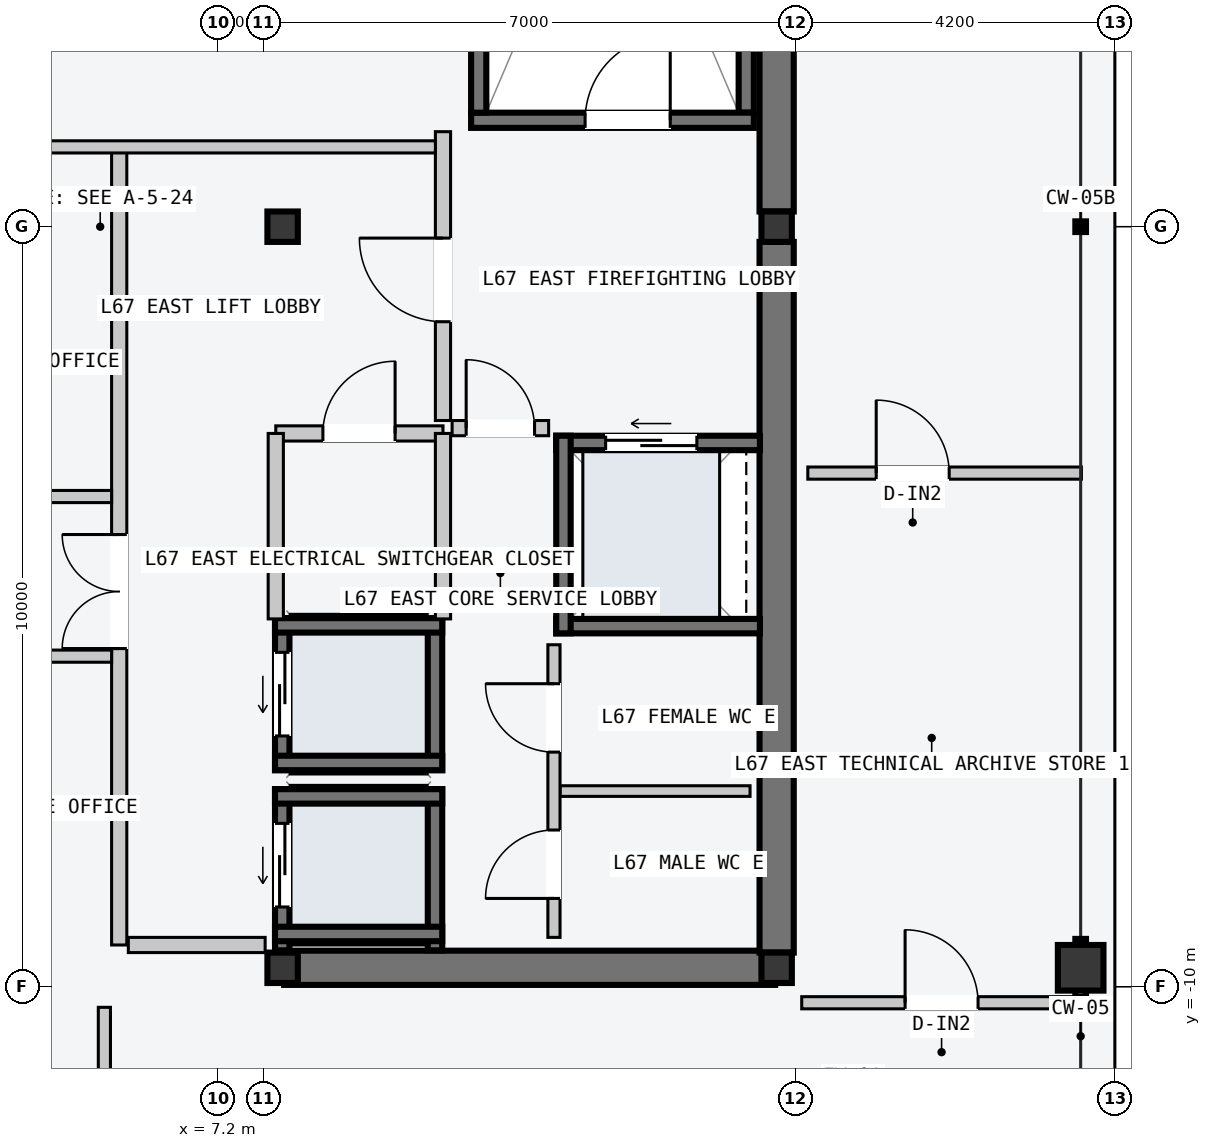
"""IFC4 building model, lengths in metres.
Left out: names, types, materials, properties, quantities, classifications, styles, units other than length and angle.
Written with IfcOpenShell. Run it as: python <this file> out.ifc"""

import sys

from ifc_helpers import new_model, si_unit, direction, frame, frame_2d, origin, origin_2d, place, context, subcontext, project, spatial, rectangle, hollow_rectangle, i_section, extrude, element, fill, save


model = new_model("IFC4")
c1 = context("Model", 3, precision=1e-05, world=origin(), true_north=direction((0.0, 1.0)))
c2 = subcontext(c1, "Body", "Model", "MODEL_VIEW")
j1 = project(units=[si_unit("LENGTHUNIT", "METRE"), si_unit("PLANEANGLEUNIT", "RADIAN")], contexts=[c1])
p1 = place(None, origin())
s1 = spatial("IfcSite", under=j1, at=p1, CompositionType="ELEMENT")
p2 = place(p1, origin())
s2 = spatial("IfcBuilding", under=s1, at=p2, CompositionType="ELEMENT")
p3 = place(p2, frame((0.0, 0.0, 254.4)))
s3 = spatial("IfcBuildingStorey", under=s2, at=p3, CompositionType="ELEMENT", Elevation=254.4)
p4 = place(p3, frame((8.07, -9.75, -0.2), z_axis=(0.0, 0.0, 1.0), x_axis=(1.0, 0.0, 0.0)))
e1 = element("IfcWall", 1, at=p4, inside=s3, PredefinedType="SHEAR", context=c2, shape_type="SweptSolid", body=[
    extrude(rectangle(XDim=6.46, YDim=0.45, at=frame_2d((3.23, 0.0))), origin(), (0.0, 0.0, 1.0), 3.6),
])
for number, where, z_axis, x_axis in (
    (2, (14.55, -9.55, -0.2), (0.0, 0.0, 1.0), (0.0, 1.0, 0.0)),
    (3, (14.55, 0.2, -0.2), (0.0, 0.0, 1.0), (0.0, 1.0, 0.0)),
):
    element("IfcWall", number, at=place(p3, frame(where, z_axis=z_axis, x_axis=x_axis)), inside=s3, PredefinedType="SHEAR", context=c2, shape_type="SweptSolid", body=[
        extrude(rectangle(XDim=9.35, YDim=0.45, at=frame_2d((4.675, 0.0))), origin(), (0.0, 0.0, 1.0), 3.6),
    ])
p5 = place(p3, frame((14.15, 1.5, -0.2), z_axis=(0.0, 0.0, 1.0), x_axis=(0.0, 1.0, 0.0)))
e4 = element("IfcWall", 4, at=p5, inside=s3, PredefinedType="SOLIDWALL", context=c2, shape_type="SweptSolid", body=[
    extrude(rectangle(XDim=7.8, YDim=0.2, at=frame_2d((3.9, 0.0))), origin(), (0.0, 0.0, 1.0), 3.6),
])
p6 = place(p3, frame((10.53, 1.4, -0.2), z_axis=(0.0, 0.0, 1.0), x_axis=(1.0, 0.0, 0.0)))
e5 = element("IfcWall", 5, at=p6, inside=s3, PredefinedType="SOLIDWALL", context=c2, shape_type="SweptSolid", body=[
    extrude(rectangle(XDim=3.72, YDim=0.2, at=frame_2d((1.86, 0.0))), origin(), (0.0, 0.0, 1.0), 3.6),
])
p7 = place(p6, frame((1.5, 0.0, 0.2)))
e6 = element("IfcOpeningElement", 6, at=p7, cuts=e5, PredefinedType="OPENING", context=c2, shape_type="SweptSolid", body=[
    extrude(rectangle(XDim=1.12, YDim=2.18, at=frame_2d((0.56, 1.09))), frame((0.0, 0.11, 0.0), z_axis=(0.0, -1.0, 0.0), x_axis=(1.0, 0.0, 0.0)), (0.0, 0.0, 1.0), 0.22),
])
p8 = place(p3, frame((10.63, 1.5, -0.2), z_axis=(0.0, 0.0, 1.0), x_axis=(0.0, 1.0, 0.0)))
e7 = element("IfcWall", 7, at=p8, inside=s3, PredefinedType="SOLIDWALL", context=c2, shape_type="SweptSolid", body=[
    extrude(rectangle(XDim=7.8, YDim=0.2, at=frame_2d((3.9, 0.0))), origin(), (0.0, 0.0, 1.0), 3.6),
])
for number, where, z_axis, x_axis in (
    (8, (8.05, -9.75, 0.0), (0.0, 0.0, 1.0), (1.0, 0.0, 0.0)),
    (9, (8.05, 0.0, 0.0), (0.0, 0.0, 1.0), (1.0, 0.0, 0.0)),
    (10, (14.55, -9.75, 0.0), (0.0, 0.0, 1.0), (1.0, 0.0, 0.0)),
    (11, (14.55, 0.0, 0.0), (0.0, 0.0, 1.0), (1.0, 0.0, 0.0)),
):
    element("IfcColumn", number, at=place(p3, frame(where, z_axis=z_axis, x_axis=x_axis)), inside=s3, PredefinedType="COLUMN", context=c2, shape_type="SweptSolid", body=[
        extrude(i_section(OverallWidth=0.4, OverallDepth=0.4, WebThickness=0.013, FlangeThickness=0.021, at=origin_2d()), origin(), (0.0, 0.0, 1.0), 3.6),
    ])
p9 = place(p3, frame((18.55, -9.75, 0.0), z_axis=(0.0, 0.0, 1.0), x_axis=(0.0, 1.0, 0.0)))
e12 = element("IfcColumn", 12, at=p9, inside=s3, PredefinedType="COLUMN", context=c2, shape_type="SweptSolid", body=[
    extrude(hollow_rectangle(XDim=0.6, YDim=0.6, WallThickness=0.025, at=origin_2d()), origin(), (0.0, 0.0, 1.0), 3.6),
])
p10 = place(p3, frame((8.045, -9.52, -0.2), z_axis=(0.0, 0.0, 1.0), x_axis=(0.0, 1.0, 0.0)))
e13 = element("IfcWall", 13, at=p10, inside=s3, PredefinedType="SOLIDWALL", context=c2, shape_type="SweptSolid", body=[
    extrude(rectangle(XDim=2.12, YDim=0.19, at=frame_2d((1.06, 0.0))), origin(), (0.0, 0.0, 1.0), 3.6),
])
p11 = place(p10, frame((0.57, 0.0, 0.2)))
e14 = element("IfcOpeningElement", 14, at=p11, cuts=e13, PredefinedType="OPENING", context=c2, shape_type="SweptSolid", body=[
    extrude(rectangle(XDim=1.1, YDim=2.2, at=frame_2d((0.55, 1.1))), frame((0.0, 0.105, 0.0), z_axis=(0.0, -1.0, 0.0), x_axis=(1.0, 0.0, 0.0)), (0.0, 0.0, 1.0), 0.21),
])
p12 = place(p3, frame((10.055, -9.52, -0.2), z_axis=(0.0, 0.0, 1.0), x_axis=(0.0, 1.0, 0.0)))
e15 = element("IfcWall", 15, at=p12, inside=s3, PredefinedType="SOLIDWALL", context=c2, shape_type="SweptSolid", body=[
    extrude(rectangle(XDim=2.12, YDim=0.19, at=frame_2d((1.06, 0.0))), origin(), (0.0, 0.0, 1.0), 3.6),
])
for number, where, z_axis, x_axis in (
    (16, (7.95, -7.495, -0.2), (0.0, 0.0, 1.0), (1.0, 0.0, 0.0)),
    (17, (7.95, -9.305, -0.2), (0.0, 0.0, 1.0), (1.0, 0.0, 0.0)),
):
    element("IfcWall", number, at=place(p3, frame(where, z_axis=z_axis, x_axis=x_axis)), inside=s3, PredefinedType="SOLIDWALL", context=c2, shape_type="SweptSolid", body=[
        extrude(rectangle(XDim=2.2, YDim=0.19, at=frame_2d((1.1, 0.0))), origin(), (0.0, 0.0, 1.0), 3.6),
    ])
p13 = place(p3, frame((8.045, -7.15, -0.2), z_axis=(0.0, 0.0, 1.0), x_axis=(0.0, 1.0, 0.0)))
e18 = element("IfcWall", 18, at=p13, inside=s3, PredefinedType="SOLIDWALL", context=c2, shape_type="SweptSolid", body=[
    extrude(rectangle(XDim=2.0, YDim=0.19, at=frame_2d((1.0, 0.0))), origin(), (0.0, 0.0, 1.0), 3.6),
])
p14 = place(p13, frame((0.45, 0.0, 0.2)))
e19 = element("IfcOpeningElement", 19, at=p14, cuts=e18, PredefinedType="OPENING", context=c2, shape_type="SweptSolid", body=[
    extrude(rectangle(XDim=1.1, YDim=2.2, at=frame_2d((0.55, 1.1))), frame((0.0, 0.105, 0.0), z_axis=(0.0, -1.0, 0.0), x_axis=(1.0, 0.0, 0.0)), (0.0, 0.0, 1.0), 0.21),
])
p15 = place(p3, frame((10.055, -7.15, -0.2), z_axis=(0.0, 0.0, 1.0), x_axis=(0.0, 1.0, 0.0)))
e20 = element("IfcWall", 20, at=p15, inside=s3, PredefinedType="SOLIDWALL", context=c2, shape_type="SweptSolid", body=[
    extrude(rectangle(XDim=2.0, YDim=0.19, at=frame_2d((1.0, 0.0))), origin(), (0.0, 0.0, 1.0), 3.6),
])
for number, where, z_axis, x_axis in (
    (21, (7.95, -5.245, -0.2), (0.0, 0.0, 1.0), (1.0, 0.0, 0.0)),
    (22, (7.95, -7.055, -0.2), (0.0, 0.0, 1.0), (1.0, 0.0, 0.0)),
):
    element("IfcWall", number, at=place(p3, frame(where, z_axis=z_axis, x_axis=x_axis)), inside=s3, PredefinedType="SOLIDWALL", context=c2, shape_type="SweptSolid", body=[
        extrude(rectangle(XDim=2.2, YDim=0.19, at=frame_2d((1.1, 0.0))), origin(), (0.0, 0.0, 1.0), 3.6),
    ])
p16 = place(p3, frame((11.65, -2.845, -0.2), z_axis=(0.0, 0.0, 1.0), x_axis=(1.0, 0.0, 0.0)))
e23 = element("IfcWall", 23, at=p16, inside=s3, PredefinedType="SOLIDWALL", context=c2, shape_type="SweptSolid", body=[
    extrude(rectangle(XDim=2.68, YDim=0.19, at=frame_2d((1.34, 0.0))), origin(), (0.0, 0.0, 1.0), 3.6),
])
p17 = place(p16, frame((0.65, 0.0, 0.2)))
e24 = element("IfcOpeningElement", 24, at=p17, cuts=e23, PredefinedType="OPENING", context=c2, shape_type="SweptSolid", body=[
    extrude(rectangle(XDim=1.2, YDim=2.2, at=frame_2d((0.6, 1.1))), frame((0.0, 0.105, 0.0), z_axis=(0.0, -1.0, 0.0), x_axis=(1.0, 0.0, 0.0)), (0.0, 0.0, 1.0), 0.21),
])
p18 = place(p3, frame((11.65, -5.255, -0.2), z_axis=(0.0, 0.0, 1.0), x_axis=(1.0, 0.0, 0.0)))
e25 = element("IfcWall", 25, at=p18, inside=s3, PredefinedType="SOLIDWALL", context=c2, shape_type="SweptSolid", body=[
    extrude(rectangle(XDim=2.68, YDim=0.19, at=frame_2d((1.34, 0.0))), origin(), (0.0, 0.0, 1.0), 3.6),
])
p19 = place(p3, frame((11.745, -5.35, -0.2), z_axis=(0.0, 0.0, 1.0), x_axis=(0.0, 1.0, 0.0)))
e26 = element("IfcWall", 26, at=p19, inside=s3, PredefinedType="SOLIDWALL", context=c2, shape_type="SweptSolid", body=[
    extrude(rectangle(XDim=2.6, YDim=0.19, at=frame_2d((1.3, 0.0))), origin(), (0.0, 0.0, 1.0), 3.6),
])
p20 = place(p3, frame((5.9, -9.45, 0.0), z_axis=(0.0, 0.0, 1.0), x_axis=(0.0, 1.0, 0.0)))
e27 = element("IfcWall", 27, at=p20, inside=s3, PredefinedType="PARTITIONING", context=c2, shape_type="SweptSolid", body=[
    extrude(rectangle(XDim=10.5, YDim=0.2, at=frame_2d((5.25, 0.0))), origin(), (0.0, 0.0, 1.0), 3.4),
])
p21 = place(p20, frame((3.9, 0.0, 0.0)))
e28 = element("IfcOpeningElement", 28, at=p21, cuts=e27, PredefinedType="OPENING", context=c2, shape_type="SweptSolid", body=[
    extrude(rectangle(XDim=1.5, YDim=2.2, at=frame_2d((0.75, 1.1))), frame((0.0, 0.11, 0.0), z_axis=(0.0, -1.0, 0.0), x_axis=(1.0, 0.0, 0.0)), (0.0, 0.0, 1.0), 0.22),
])
p22 = place(p3, frame((6.02, -9.45, 0.0), z_axis=(0.0, 0.0, 1.0), x_axis=(1.0, 0.0, 0.0)))
e29 = element("IfcWall", 29, at=p22, inside=s3, PredefinedType="PARTITIONING", context=c2, shape_type="SweptSolid", body=[
    extrude(rectangle(XDim=1.8, YDim=0.2, at=frame_2d((0.9, 0.0))), origin(), (0.0, 0.0, 1.0), 3.4),
])
p23 = place(p3, frame((10.16, -2.55, 0.0), z_axis=(0.0, 0.0, 1.0), x_axis=(0.0, 1.0, 0.0)))
e30 = element("IfcWall", 30, at=p23, inside=s3, PredefinedType="PARTITIONING", context=c2, shape_type="SweptSolid", body=[
    extrude(rectangle(XDim=3.8, YDim=0.2, at=frame_2d((1.9, 0.0))), origin(), (0.0, 0.0, 1.0), 3.4),
])
p24 = place(p23, frame((1.3, 0.0, 0.0)))
e31 = element("IfcOpeningElement", 31, at=p24, cuts=e30, PredefinedType="OPENING", context=c2, shape_type="SweptSolid", body=[
    extrude(rectangle(XDim=1.1, YDim=2.15, at=frame_2d((0.55, 1.075))), frame((0.0, 0.11, 0.0), z_axis=(0.0, -1.0, 0.0), x_axis=(1.0, 0.0, 0.0)), (0.0, 0.0, 1.0), 0.22),
])
p25 = place(p3, frame((10.28, -2.65, 0.0), z_axis=(0.0, 0.0, 1.0), x_axis=(1.0, 0.0, 0.0)))
e32 = element("IfcWall", 32, at=p25, inside=s3, PredefinedType="PARTITIONING", context=c2, shape_type="SweptSolid", body=[
    extrude(rectangle(XDim=1.27, YDim=0.2, at=frame_2d((0.635, 0.0))), origin(), (0.0, 0.0, 1.0), 3.4),
])
p26 = place(p25, frame((0.185, 0.0, 0.0)))
e33 = element("IfcOpeningElement", 33, at=p26, cuts=e32, PredefinedType="OPENING", context=c2, shape_type="SweptSolid", body=[
    extrude(rectangle(XDim=0.9, YDim=2.15, at=frame_2d((0.45, 1.075))), frame((0.0, 0.11, 0.0), z_axis=(0.0, -1.0, 0.0), x_axis=(1.0, 0.0, 0.0)), (0.0, 0.0, 1.0), 0.22),
])
p27 = place(p3, frame((7.96, -2.72, 0.0), z_axis=(0.0, 0.0, 1.0), x_axis=(1.0, 0.0, 0.0)))
e34 = element("IfcWall", 34, at=p27, inside=s3, PredefinedType="PARTITIONING", context=c2, shape_type="SweptSolid", body=[
    extrude(rectangle(XDim=2.2, YDim=0.2, at=frame_2d((1.1, 0.0))), origin(), (0.0, 0.0, 1.0), 3.4),
])
p28 = place(p27, frame((0.62, 0.0, 0.0)))
e35 = element("IfcOpeningElement", 35, at=p28, cuts=e34, PredefinedType="OPENING", context=c2, shape_type="SweptSolid", body=[
    extrude(rectangle(XDim=0.95, YDim=2.1, at=frame_2d((0.475, 1.05))), frame((0.0, 0.11, 0.0), z_axis=(0.0, -1.0, 0.0), x_axis=(1.0, 0.0, 0.0)), (0.0, 0.0, 1.0), 0.22),
])
for number, where, z_axis, x_axis in (
    (36, (7.96, -5.16, 0.0), (0.0, 0.0, 1.0), (0.0, 1.0, 0.0)),
    (37, (10.16, -5.16, 0.0), (0.0, 0.0, 1.0), (0.0, 1.0, 0.0)),
):
    element("IfcWall", number, at=place(p3, frame(where, z_axis=z_axis, x_axis=x_axis)), inside=s3, PredefinedType="PARTITIONING", context=c2, shape_type="SweptSolid", body=[
        extrude(rectangle(XDim=2.44, YDim=0.2, at=frame_2d((1.22, 0.0))), origin(), (0.0, 0.0, 1.0), 3.4),
    ])
p29 = place(p3, frame((11.7, -7.425, 0.0), z_axis=(0.0, 0.0, 1.0), x_axis=(1.0, 0.0, 0.0)))
e38 = element("IfcWall", 38, at=p29, inside=s3, PredefinedType="PARTITIONING", context=c2, shape_type="SweptSolid", body=[
    extrude(rectangle(XDim=2.5, YDim=0.14, at=frame_2d((1.25, 0.0))), origin(), (0.0, 0.0, 1.0), 3.4),
])
p30 = place(p3, frame((11.62, -9.35, 0.0), z_axis=(0.0, 0.0, 1.0), x_axis=(0.0, 1.0, 0.0)))
e39 = element("IfcWall", 39, at=p30, inside=s3, PredefinedType="PARTITIONING", context=c2, shape_type="SweptSolid", body=[
    extrude(rectangle(XDim=3.85, YDim=0.16, at=frame_2d((1.925, 0.0))), origin(), (0.0, 0.0, 1.0), 3.4),
])
p31 = place(p30, frame((0.512, 0.0, 0.0)))
e40 = element("IfcOpeningElement", 40, at=p31, cuts=e39, PredefinedType="OPENING", context=c2, shape_type="SweptSolid", body=[
    extrude(rectangle(XDim=0.9, YDim=2.15, at=frame_2d((0.45, 1.075))), frame((0.0, 0.09, 0.0), z_axis=(0.0, -1.0, 0.0), x_axis=(1.0, 0.0, 0.0)), (0.0, 0.0, 1.0), 0.18),
])
p32 = place(p30, frame((2.438, 0.0, 0.0)))
e41 = element("IfcOpeningElement", 41, at=p32, cuts=e39, PredefinedType="OPENING", context=c2, shape_type="SweptSolid", body=[
    extrude(rectangle(XDim=0.9, YDim=2.15, at=frame_2d((0.45, 1.075))), frame((0.0, 0.09, 0.0), z_axis=(0.0, -1.0, 0.0), x_axis=(1.0, 0.0, 0.0)), (0.0, 0.0, 1.0), 0.18),
])
p33 = place(p3, frame((1.26, 1.05, 0.0), z_axis=(0.0, 0.0, 1.0), x_axis=(1.0, 0.0, 0.0)))
e42 = element("IfcWall", 42, at=p33, inside=s3, PredefinedType="PARTITIONING", context=c2, shape_type="SweptSolid", body=[
    extrude(rectangle(XDim=8.8, YDim=0.16, at=frame_2d((4.4, 0.0))), origin(), (0.0, 0.0, 1.0), 3.4),
])
for number, where, z_axis, x_axis in (
    (43, (1.26, -3.55, 0.0), (0.0, 0.0, 1.0), (1.0, 0.0, 0.0)),
    (44, (1.26, -5.65, 0.0), (0.0, 0.0, 1.0), (1.0, 0.0, 0.0)),
):
    element("IfcWall", number, at=place(p3, frame(where, z_axis=z_axis, x_axis=x_axis)), inside=s3, PredefinedType="PARTITIONING", context=c2, shape_type="SweptSolid", body=[
        extrude(rectangle(XDim=4.54, YDim=0.16, at=frame_2d((2.27, 0.0))), origin(), (0.0, 0.0, 1.0), 3.4),
    ])
p34 = place(p3, frame((5.705, -17.56, 0.0), z_axis=(0.0, 0.0, 1.0), x_axis=(0.0, 1.0, 0.0)))
e45 = element("IfcWall", 45, at=p34, inside=s3, PredefinedType="PARTITIONING", context=c2, shape_type="SweptSolid", body=[
    extrude(rectangle(XDim=7.29, YDim=0.16, at=frame_2d((3.645, 0.0))), origin(), (0.0, 0.0, 1.0), 3.4),
])
p35 = place(p34, frame((1.05, 0.0, 0.0)))
e46 = element("IfcOpeningElement", 46, at=p35, cuts=e45, PredefinedType="OPENING", context=c2, shape_type="SweptSolid", body=[
    extrude(rectangle(XDim=0.96, YDim=2.18, at=frame_2d((0.48, 1.09))), frame((0.0, 0.09, 0.0), z_axis=(0.0, -1.0, 0.0), x_axis=(1.0, 0.0, 0.0)), (0.0, 0.0, 1.0), 0.18),
])
p36 = place(p3, frame((14.88, -10.21, 0.0), z_axis=(0.0, 0.0, 1.0), x_axis=(1.0, 0.0, 0.0)))
e47 = element("IfcWall", 47, at=p36, inside=s3, PredefinedType="PARTITIONING", context=c2, shape_type="SweptSolid", body=[
    extrude(rectangle(XDim=3.68, YDim=0.16, at=frame_2d((1.84, 0.0))), origin(), (0.0, 0.0, 1.0), 3.4),
])
p37 = place(p36, frame((1.36, 0.0, 0.0)))
e48 = element("IfcOpeningElement", 48, at=p37, cuts=e47, PredefinedType="OPENING", context=c2, shape_type="SweptSolid", body=[
    extrude(rectangle(XDim=0.96, YDim=2.18, at=frame_2d((0.48, 1.09))), frame((0.0, 0.09, 0.0), z_axis=(0.0, -1.0, 0.0), x_axis=(1.0, 0.0, 0.0)), (0.0, 0.0, 1.0), 0.18),
])
p38 = place(p3, frame((14.96, -3.242, 0.0), z_axis=(0.0, 0.0, 1.0), x_axis=(1.0, 0.0, 0.0)))
e49 = element("IfcWall", 49, at=p38, inside=s3, PredefinedType="PARTITIONING", context=c2, shape_type="SweptSolid", body=[
    extrude(rectangle(XDim=3.6, YDim=0.16, at=frame_2d((1.8, 0.0))), origin(), (0.0, 0.0, 1.0), 3.05),
])
p39 = place(p38, frame((0.9, 0.0, 0.0)))
e50 = element("IfcOpeningElement", 50, at=p39, cuts=e49, PredefinedType="OPENING", context=c2, shape_type="SweptSolid", body=[
    extrude(rectangle(XDim=0.96, YDim=2.18, at=frame_2d((0.48, 1.09))), frame((0.0, 0.09, 0.0), z_axis=(0.0, -1.0, 0.0), x_axis=(1.0, 0.0, 0.0)), (0.0, 0.0, 1.0), 0.18),
])
p40 = place(p7, origin())
e51 = element("IfcDoor", 51, at=p40, inside=s3, OperationType="SINGLE_SWING_RIGHT", PredefinedType="DOOR", context=c2, shape_type="SweptSolid", body=[
    extrude(rectangle(XDim=1.12, YDim=2.18, at=frame_2d((0.56, 1.09))), frame((0.0, 0.025, 0.0), z_axis=(0.0, -1.0, 0.0), x_axis=(1.0, 0.0, 0.0)), (0.0, 0.0, 1.0), 0.05),
])
fill(e6, e51)
p41 = place(p11, origin())
e52 = element("IfcDoor", 52, at=p41, inside=s3, OperationType="SLIDING_TO_LEFT", PredefinedType="DOOR", context=c2, shape_type="SweptSolid", body=[
    extrude(rectangle(XDim=1.1, YDim=2.2, at=frame_2d((0.55, 1.1))), frame((0.0, 0.025, 0.0), z_axis=(0.0, -1.0, 0.0), x_axis=(1.0, 0.0, 0.0)), (0.0, 0.0, 1.0), 0.05),
])
fill(e14, e52)
p42 = place(p14, origin())
e53 = element("IfcDoor", 53, at=p42, inside=s3, OperationType="SLIDING_TO_LEFT", PredefinedType="DOOR", context=c2, shape_type="SweptSolid", body=[
    extrude(rectangle(XDim=1.1, YDim=2.2, at=frame_2d((0.55, 1.1))), frame((0.0, 0.025, 0.0), z_axis=(0.0, -1.0, 0.0), x_axis=(1.0, 0.0, 0.0)), (0.0, 0.0, 1.0), 0.05),
])
fill(e19, e53)
p43 = place(p17, origin())
e54 = element("IfcDoor", 54, at=p43, inside=s3, OperationType="SLIDING_TO_LEFT", PredefinedType="DOOR", context=c2, shape_type="SweptSolid", body=[
    extrude(rectangle(XDim=1.2, YDim=2.2, at=frame_2d((0.6, 1.1))), frame((0.0, 0.025, 0.0), z_axis=(0.0, -1.0, 0.0), x_axis=(1.0, 0.0, 0.0)), (0.0, 0.0, 1.0), 0.05),
])
fill(e24, e54)
p44 = place(p21, origin())
e55 = element("IfcDoor", 55, at=p44, inside=s3, OperationType="DOUBLE_DOOR_SINGLE_SWING", PredefinedType="DOOR", context=c2, shape_type="SweptSolid", body=[
    extrude(rectangle(XDim=1.5, YDim=2.2, at=frame_2d((0.75, 1.1))), frame((0.0, 0.025, 0.0), z_axis=(0.0, -1.0, 0.0), x_axis=(1.0, 0.0, 0.0)), (0.0, 0.0, 1.0), 0.05),
])
fill(e28, e55)
p45 = place(p24, origin())
e56 = element("IfcDoor", 56, at=p45, inside=s3, OperationType="SINGLE_SWING_RIGHT", PredefinedType="DOOR", context=c2, shape_type="SweptSolid", body=[
    extrude(rectangle(XDim=1.1, YDim=2.15, at=frame_2d((0.55, 1.075))), frame((0.0, 0.025, 0.0), z_axis=(0.0, -1.0, 0.0), x_axis=(1.0, 0.0, 0.0)), (0.0, 0.0, 1.0), 0.05),
])
fill(e31, e56)
p46 = place(p26, origin())
e57 = element("IfcDoor", 57, at=p46, inside=s3, OperationType="SINGLE_SWING_LEFT", PredefinedType="DOOR", context=c2, shape_type="SweptSolid", body=[
    extrude(rectangle(XDim=0.9, YDim=2.15, at=frame_2d((0.45, 1.075))), frame((0.0, 0.025, 0.0), z_axis=(0.0, -1.0, 0.0), x_axis=(1.0, 0.0, 0.0)), (0.0, 0.0, 1.0), 0.05),
])
fill(e33, e57)
p47 = place(p28, origin())
e58 = element("IfcDoor", 58, at=p47, inside=s3, OperationType="SINGLE_SWING_RIGHT", PredefinedType="DOOR", context=c2, shape_type="SweptSolid", body=[
    extrude(rectangle(XDim=0.95, YDim=2.1, at=frame_2d((0.475, 1.05))), frame((0.0, 0.025, 0.0), z_axis=(0.0, -1.0, 0.0), x_axis=(1.0, 0.0, 0.0)), (0.0, 0.0, 1.0), 0.05),
])
fill(e35, e58)
p48 = place(p31, origin())
e59 = element("IfcDoor", 59, at=p48, inside=s3, OperationType="SINGLE_SWING_LEFT", PredefinedType="DOOR", context=c2, shape_type="SweptSolid", body=[
    extrude(rectangle(XDim=0.9, YDim=2.15, at=frame_2d((0.45, 1.075))), frame((0.0, 0.025, 0.0), z_axis=(0.0, -1.0, 0.0), x_axis=(1.0, 0.0, 0.0)), (0.0, 0.0, 1.0), 0.05),
])
fill(e40, e59)
p49 = place(p32, origin())
e60 = element("IfcDoor", 60, at=p49, inside=s3, OperationType="SINGLE_SWING_RIGHT", PredefinedType="DOOR", context=c2, shape_type="SweptSolid", body=[
    extrude(rectangle(XDim=0.9, YDim=2.15, at=frame_2d((0.45, 1.075))), frame((0.0, 0.025, 0.0), z_axis=(0.0, -1.0, 0.0), x_axis=(1.0, 0.0, 0.0)), (0.0, 0.0, 1.0), 0.05),
])
fill(e41, e60)
p50 = place(p37, origin())
e61 = element("IfcDoor", 61, at=p50, inside=s3, OperationType="SINGLE_SWING_LEFT", PredefinedType="DOOR", context=c2, shape_type="SweptSolid", body=[
    extrude(rectangle(XDim=0.96, YDim=2.18, at=frame_2d((0.48, 1.09))), frame((0.0, 0.025, 0.0), z_axis=(0.0, -1.0, 0.0), x_axis=(1.0, 0.0, 0.0)), (0.0, 0.0, 1.0), 0.05),
])
fill(e48, e61)
p51 = place(p39, origin())
e62 = element("IfcDoor", 62, at=p51, inside=s3, OperationType="SINGLE_SWING_LEFT", PredefinedType="DOOR", context=c2, shape_type="SweptSolid", body=[
    extrude(rectangle(XDim=0.96, YDim=2.18, at=frame_2d((0.48, 1.09))), frame((0.0, 0.025, 0.0), z_axis=(0.0, -1.0, 0.0), x_axis=(1.0, 0.0, 0.0)), (0.0, 0.0, 1.0), 0.05),
])
fill(e50, e62)
save(model, sys.argv[1])
